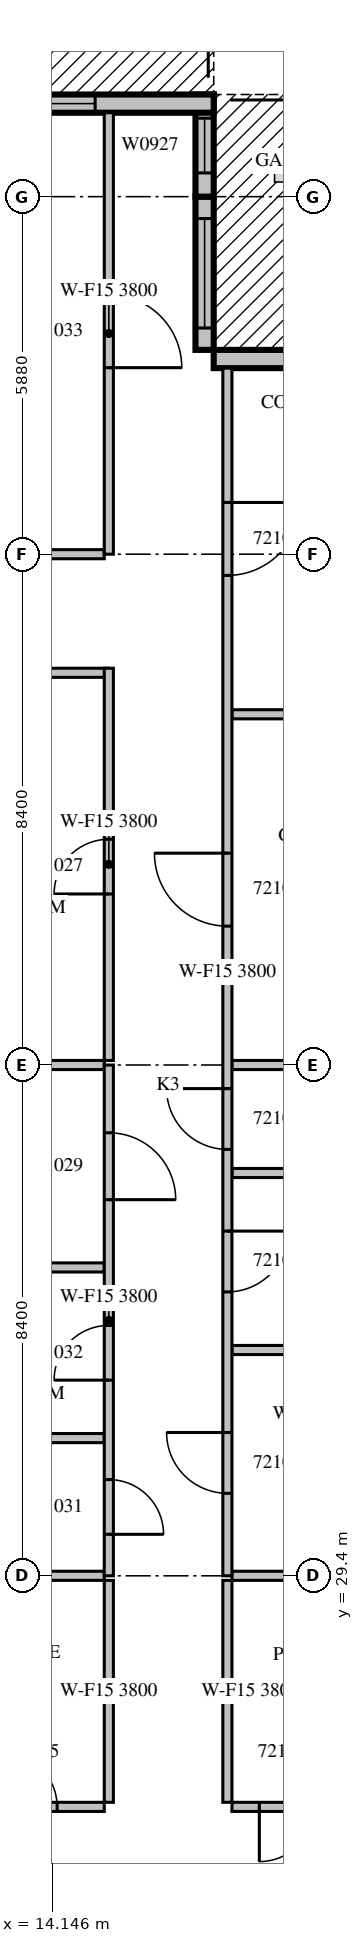
"""IFC4 building model, lengths in metres.
Left out: names, types, materials, properties, quantities, classifications, styles, units other than length and angle.
Written with IfcOpenShell. Run it as: python <this file> out.ifc"""

import sys

from ifc_helpers import new_model, si_unit, direction, frame, frame_2d, origin, place, context, subcontext, project, spatial, rectangle, extrude, source, transform, mapped, element, fill, save


model = new_model("IFC4")
c1 = context("Model", 3, precision=1e-05, world=origin(), true_north=direction((0.0, 1.0)))
c2 = subcontext(c1, "Body", "Model", "MODEL_VIEW")
j1 = project(units=[si_unit("LENGTHUNIT", "METRE"), si_unit("PLANEANGLEUNIT", "RADIAN")], contexts=[c1])
p1 = place(None, origin())
s1 = spatial("IfcSite", under=j1, at=p1, CompositionType="ELEMENT")
p2 = place(p1, origin())
s2 = spatial("IfcBuilding", under=s1, at=p2, CompositionType="ELEMENT")
p3 = place(p2, frame((0.0, 0.0, 99.3)))
s3 = spatial("IfcBuildingStorey", under=s2, at=p3, CompositionType="ELEMENT", Elevation=99.3)
m1 = source(origin(), c2, "Body", "SweptSolid", [
    extrude(rectangle(XDim=4.2, YDim=0.3, at=frame_2d((2.1, 0.0))), origin(), (0.0, 0.0, 1.0), 3.8),
])
p4 = place(p3, frame((21.0, 49.41, 0.0), z_axis=(0.0, 0.0, 1.0), x_axis=(-1.0, 0.0, 0.0)))
e1 = element("IfcWall", 1, at=p4, inside=s3, PredefinedType="STANDARD", context=c2, shape_type="MappedRepresentation", body=[
    mapped(m1, transform((0.0, 0.0, 0.0), scale=1.0)),
])
m2 = source(origin(), c2, "Body", "SweptSolid", [
    extrude(rectangle(XDim=1.8, YDim=2.4, at=frame_2d((0.9, 1.2))), frame((0.0, 0.16, 0.0), z_axis=(0.0, -1.0, 0.0), x_axis=(1.0, 0.0, 0.0)), (0.0, 0.0, 1.0), 0.32),
])
p5 = place(p4, frame((1.2, 0.0, 0.0)))
e2 = element("IfcOpeningElement", 2, at=p5, cuts=e1, PredefinedType="OPENING", context=c2, shape_type="MappedRepresentation", body=[
    mapped(m2, transform((0.0, 0.0, 0.0), scale=1.0)),
])
m3 = source(origin(), c2, "Body", "SweptSolid", [
    extrude(rectangle(XDim=2.52, YDim=0.3, at=frame_2d((1.26, 0.0))), origin(), (0.0, 0.0, 1.0), 3.8),
])
p6 = place(p3, frame((16.65, 49.56, 0.0), z_axis=(0.0, 0.0, 1.0), x_axis=(0.0, 1.0, 0.0)))
e3 = element("IfcWall", 3, at=p6, inside=s3, PredefinedType="STANDARD", context=c2, shape_type="MappedRepresentation", body=[
    mapped(m3, transform((0.0, 0.0, 0.0), scale=1.0)),
])
p7 = place(p6, frame((0.36, 0.0, 0.0)))
e4 = element("IfcOpeningElement", 4, at=p7, cuts=e3, PredefinedType="OPENING", context=c2, shape_type="MappedRepresentation", body=[
    mapped(m2, transform((0.0, 0.0, 0.0), scale=1.0)),
])
m4 = source(origin(), c2, "Body", "SweptSolid", [
    extrude(rectangle(XDim=1.68, YDim=0.3, at=frame_2d((0.84, 0.0))), origin(), (0.0, 0.0, 1.0), 3.8),
])
p8 = place(p3, frame((16.65, 52.08, 0.0), z_axis=(0.0, 0.0, 1.0), x_axis=(0.0, 1.0, 0.0)))
e5 = element("IfcWall", 5, at=p8, inside=s3, PredefinedType="STANDARD", context=c2, shape_type="MappedRepresentation", body=[
    mapped(m4, transform((0.0, 0.0, 0.0), scale=1.0)),
])
m5 = source(origin(), c2, "Body", "SweptSolid", [
    extrude(rectangle(XDim=0.9, YDim=2.7, at=frame_2d((0.45, 1.35))), frame((0.0, 0.16, 0.0), z_axis=(0.0, -1.0, 0.0), x_axis=(1.0, 0.0, 0.0)), (0.0, 0.0, 1.0), 0.32),
])
p9 = place(p8, frame((0.39, 0.0, 0.6)))
e6 = element("IfcOpeningElement", 6, at=p9, cuts=e5, PredefinedType="OPENING", context=c2, shape_type="MappedRepresentation", body=[
    mapped(m5, transform((0.0, 0.0, 0.0), scale=1.0)),
])
p10 = place(p3, frame((16.8, 53.61, 0.0), z_axis=(0.0, 0.0, 1.0), x_axis=(-1.0, 0.0, 0.0)))
e7 = element("IfcWall", 7, at=p10, inside=s3, PredefinedType="STANDARD", context=c2, shape_type="SweptSolid", body=[
    extrude(rectangle(XDim=10.5, YDim=0.3, at=frame_2d((5.25, 0.0))), origin(), (0.0, 0.0, 1.0), 3.8),
])
p11 = place(p10, frame((1.95, 0.0, 0.0)))
e8 = element("IfcOpeningElement", 8, at=p11, cuts=e7, PredefinedType="OPENING", context=c2, shape_type="MappedRepresentation", body=[
    mapped(m2, transform((0.0, 0.0, 0.0), scale=1.0)),
])
m6 = source(origin(), c2, "Body", "SweptSolid", [
    extrude(rectangle(XDim=1.8, YDim=2.7, at=frame_2d((0.9, 1.35))), frame((0.0, 0.16, 0.0), z_axis=(0.0, -1.0, 0.0), x_axis=(1.0, 0.0, 0.0)), (0.0, 0.0, 1.0), 0.32),
])
p12 = place(p10, frame((8.025, 0.0, 0.6)))
e9 = element("IfcOpeningElement", 9, at=p12, cuts=e7, PredefinedType="OPENING", context=c2, shape_type="MappedRepresentation", body=[
    mapped(m6, transform((0.0, 0.0, 0.0), scale=1.0)),
])
p13 = place(p3, frame((6.505, 25.6, 0.0), z_axis=(0.0, 0.0, 1.0), x_axis=(1.0, 0.0, 0.0)))
e10 = element("IfcWall", 10, at=p13, inside=s3, PredefinedType="PARTITIONING", context=c2, shape_type="SweptSolid", body=[
    extrude(rectangle(XDim=8.495, YDim=0.15, at=frame_2d((4.247, 0.0))), origin(), (0.0, 0.0, 1.0), 3.8),
])
m7 = source(origin(), c2, "Body", "SweptSolid", [
    extrude(rectangle(XDim=0.9, YDim=2.1, at=frame_2d((0.45, 1.05))), frame((0.0, 0.085, 0.0), z_axis=(0.0, -1.0, 0.0), x_axis=(1.0, 0.0, 0.0)), (0.0, 0.0, 1.0), 0.17),
])
p14 = place(p13, frame((1.745, 0.0, 0.0)))
e11 = element("IfcOpeningElement", 11, at=p14, cuts=e10, PredefinedType="OPENING", context=c2, shape_type="MappedRepresentation", body=[
    mapped(m7, transform((0.0, 0.0, 0.0), scale=1.0)),
])
p15 = place(p13, frame((6.82, 0.0, 0.0)))
e12 = element("IfcOpeningElement", 12, at=p15, cuts=e10, PredefinedType="OPENING", context=c2, shape_type="MappedRepresentation", body=[
    mapped(m7, transform((0.0, 0.0, 0.0), scale=1.0)),
])
m8 = source(origin(), c2, "Body", "SweptSolid", [
    extrude(rectangle(XDim=3.6, YDim=0.15, at=frame_2d((1.8, 0.0))), origin(), (0.0, 0.0, 1.0), 3.8),
])
p16 = place(p3, frame((17.1, 25.6, 0.0), z_axis=(0.0, 0.0, 1.0), x_axis=(1.0, 0.0, 0.0)))
e13 = element("IfcWall", 13, at=p16, inside=s3, PredefinedType="PARTITIONING", context=c2, shape_type="MappedRepresentation", body=[
    mapped(m8, transform((0.0, 0.0, 0.0), scale=1.0)),
])
p17 = place(p16, frame((0.45, 0.0, 0.0)))
e14 = element("IfcOpeningElement", 14, at=p17, cuts=e13, PredefinedType="OPENING", context=c2, shape_type="MappedRepresentation", body=[
    mapped(m7, transform((0.0, 0.0, 0.0), scale=1.0)),
])
m9 = source(origin(), c2, "Body", "SweptSolid", [
    extrude(rectangle(XDim=3.65, YDim=0.15, at=frame_2d((1.825, 0.0))), origin(), (0.0, 0.0, 1.0), 3.8),
])
for number, where, z_axis, x_axis in (
    (15, (15.075, 25.675, 0.0), (0.0, 0.0, 1.0), (0.0, 1.0, 0.0)),
    (16, (17.025, 29.325, 0.0), (0.0, 0.0, 1.0), (0.0, -1.0, 0.0)),
):
    element("IfcWall", number, at=place(p3, frame(where, z_axis=z_axis, x_axis=x_axis)), inside=s3, PredefinedType="PARTITIONING", context=c2, shape_type="MappedRepresentation", body=[
        mapped(m9, transform((0.0, 0.0, 0.0), scale=1.0)),
    ])
m10 = source(origin(), c2, "Body", "SweptSolid", [
    extrude(rectangle(XDim=3.901, YDim=0.15, at=frame_2d((1.95, 0.0))), origin(), (0.0, 0.0, 1.0), 3.8),
])
p18 = place(p3, frame((15.0, 29.4, 0.0), z_axis=(0.0, 0.0, 1.0), x_axis=(-1.0, 0.0, 0.0)))
e17 = element("IfcWall", 17, at=p18, inside=s3, PredefinedType="PARTITIONING", context=c2, shape_type="MappedRepresentation", body=[
    mapped(m10, transform((0.0, 0.0, 0.0), scale=1.0)),
])
m11 = source(origin(), c2, "Body", "SweptSolid", [
    extrude(rectangle(XDim=2.701, YDim=0.15, at=frame_2d((1.351, 0.0))), origin(), (0.0, 0.0, 1.0), 3.8),
])
p19 = place(p3, frame((19.801, 29.4, 0.0), z_axis=(0.0, 0.0, 1.0), x_axis=(-1.0, 0.0, 0.0)))
e18 = element("IfcWall", 18, at=p19, inside=s3, PredefinedType="PARTITIONING", context=c2, shape_type="MappedRepresentation", body=[
    mapped(m11, transform((0.0, 0.0, 0.0), scale=1.0)),
])
m12 = source(origin(), c2, "Body", "SweptSolid", [
    extrude(rectangle(XDim=3.975, YDim=0.15, at=frame_2d((1.988, 0.0))), origin(), (0.0, 0.0, 1.0), 3.8),
])
p20 = place(p3, frame((15.075, 44.25, 0.0), z_axis=(0.0, 0.0, 1.0), x_axis=(-1.0, 0.0, 0.0)))
e19 = element("IfcWall", 19, at=p20, inside=s3, PredefinedType="PARTITIONING", context=c2, shape_type="MappedRepresentation", body=[
    mapped(m12, transform((0.0, 0.0, 0.0), scale=1.0)),
])
m13 = source(origin(), c2, "Body", "SweptSolid", [
    extrude(rectangle(XDim=6.45, YDim=0.15, at=frame_2d((3.225, 0.0))), origin(), (0.0, 0.0, 1.0), 3.8),
])
p21 = place(p3, frame((15.075, 37.875, 0.0), z_axis=(0.0, 0.0, 1.0), x_axis=(0.0, 1.0, 0.0)))
e20 = element("IfcWall", 20, at=p21, inside=s3, PredefinedType="PARTITIONING", context=c2, shape_type="MappedRepresentation", body=[
    mapped(m13, transform((0.0, 0.0, 0.0), scale=1.0)),
])
p22 = place(p21, frame((2.737, 0.0, 0.0)))
e21 = element("IfcOpeningElement", 21, at=p22, cuts=e20, PredefinedType="OPENING", context=c2, shape_type="MappedRepresentation", body=[
    mapped(m7, transform((0.0, 0.0, 0.0), scale=1.0)),
])
m14 = source(origin(), c2, "Body", "SweptSolid", [
    extrude(rectangle(XDim=3.75, YDim=0.15, at=frame_2d((1.875, 0.0))), origin(), (0.0, 0.0, 1.0), 3.8),
])
for number, where, z_axis, x_axis in (
    (22, (15.0, 31.665, 0.0), (0.0, 0.0, 1.0), (-1.0, 0.0, 0.0)),
    (23, (15.0, 34.471, 0.0), (0.0, 0.0, 1.0), (-1.0, 0.0, 0.0)),
    (24, (15.0, 37.8, 0.0), (0.0, 0.0, 1.0), (-1.0, 0.0, 0.0)),
    (25, (15.0, 46.2, 0.0), (0.0, 0.0, 1.0), (-1.0, 0.0, 0.0)),
):
    element("IfcWall", number, at=place(p3, frame(where, z_axis=z_axis, x_axis=x_axis)), inside=s3, PredefinedType="PARTITIONING", context=c2, shape_type="MappedRepresentation", body=[
        mapped(m14, transform((0.0, 0.0, 0.0), scale=1.0)),
    ])
for number, where, z_axis, x_axis in (
    (26, (17.1, 33.113, 0.0), (0.0, 0.0, 1.0), (1.0, 0.0, 0.0)),
    (27, (17.1, 36.024, 0.0), (0.0, 0.0, 1.0), (1.0, 0.0, 0.0)),
    (28, (17.1, 43.568, 0.0), (0.0, 0.0, 1.0), (1.0, 0.0, 0.0)),
):
    element("IfcWall", number, at=place(p3, frame(where, z_axis=z_axis, x_axis=x_axis)), inside=s3, PredefinedType="PARTITIONING", context=c2, shape_type="MappedRepresentation", body=[
        mapped(m8, transform((0.0, 0.0, 0.0), scale=1.0)),
    ])
p23 = place(p3, frame((19.801, 37.8, 0.0), z_axis=(0.0, 0.0, 1.0), x_axis=(-1.0, 0.0, 0.0)))
e29 = element("IfcWall", 29, at=p23, inside=s3, PredefinedType="PARTITIONING", context=c2, shape_type="MappedRepresentation", body=[
    mapped(m11, transform((0.0, 0.0, 0.0), scale=1.0)),
])
m15 = source(origin(), c2, "Body", "SweptSolid", [
    extrude(rectangle(XDim=8.4, YDim=0.15, at=frame_2d((4.2, 0.0))), origin(), (0.0, 0.0, 1.0), 3.8),
])
p24 = place(p3, frame((15.075, 29.4, 0.0), z_axis=(0.0, 0.0, 1.0), x_axis=(0.0, 1.0, 0.0)))
e30 = element("IfcWall", 30, at=p24, inside=s3, PredefinedType="PARTITIONING", context=c2, shape_type="MappedRepresentation", body=[
    mapped(m15, transform((0.0, 0.0, 0.0), scale=1.0)),
])
m16 = source(origin(), c2, "Body", "SweptSolid", [
    extrude(rectangle(XDim=1.1, YDim=2.1, at=frame_2d((0.55, 1.05))), frame((0.0, 0.085, 0.0), z_axis=(0.0, -1.0, 0.0), x_axis=(1.0, 0.0, 0.0)), (0.0, 0.0, 1.0), 0.17),
])
p25 = place(p24, frame((6.185, 0.0, 0.0)))
e31 = element("IfcOpeningElement", 31, at=p25, cuts=e30, PredefinedType="OPENING", context=c2, shape_type="MappedRepresentation", body=[
    mapped(m16, transform((0.0, 0.0, 0.0), scale=1.0)),
])
p26 = place(p24, frame((0.682, 0.0, 0.0)))
e32 = element("IfcOpeningElement", 32, at=p26, cuts=e30, PredefinedType="OPENING", context=c2, shape_type="MappedRepresentation", body=[
    mapped(m7, transform((0.0, 0.0, 0.0), scale=1.0)),
])
p27 = place(p24, frame((3.218, 0.0, 0.0)))
e33 = element("IfcOpeningElement", 33, at=p27, cuts=e30, PredefinedType="OPENING", context=c2, shape_type="MappedRepresentation", body=[
    mapped(m7, transform((0.0, 0.0, 0.0), scale=1.0)),
])
m17 = source(origin(), c2, "Body", "SweptSolid", [
    extrude(rectangle(XDim=7.26, YDim=0.15, at=frame_2d((3.63, 0.0))), origin(), (0.0, 0.0, 1.0), 3.8),
])
p28 = place(p3, frame((15.075, 46.2, 0.0), z_axis=(0.0, 0.0, 1.0), x_axis=(0.0, 1.0, 0.0)))
e34 = element("IfcWall", 34, at=p28, inside=s3, PredefinedType="PARTITIONING", context=c2, shape_type="MappedRepresentation", body=[
    mapped(m17, transform((0.0, 0.0, 0.0), scale=1.0)),
])
m18 = source(origin(), c2, "Body", "SweptSolid", [
    extrude(rectangle(XDim=1.2, YDim=2.1, at=frame_2d((0.6, 1.05))), frame((0.0, 0.085, 0.0), z_axis=(0.0, -1.0, 0.0), x_axis=(1.0, 0.0, 0.0)), (0.0, 0.0, 1.0), 0.17),
])
p29 = place(p28, frame((3.067, 0.0, 0.0)))
e35 = element("IfcOpeningElement", 35, at=p29, cuts=e34, PredefinedType="OPENING", context=c2, shape_type="MappedRepresentation", body=[
    mapped(m18, transform((0.0, 0.0, 0.0), scale=1.0)),
])
p30 = place(p3, frame((17.025, 49.26, 0.0), z_axis=(0.0, 0.0, 1.0), x_axis=(0.0, -1.0, 0.0)))
e36 = element("IfcWall", 36, at=p30, inside=s3, PredefinedType="PARTITIONING", context=c2, shape_type="SweptSolid", body=[
    extrude(rectangle(XDim=19.86, YDim=0.15, at=frame_2d((9.93, 0.0))), origin(), (0.0, 0.0, 1.0), 3.8),
])
m19 = source(origin(), c2, "Body", "SweptSolid", [
    extrude(rectangle(XDim=1.0, YDim=2.1, at=frame_2d((0.5, 1.05))), frame((0.0, 0.085, 0.0), z_axis=(0.0, -1.0, 0.0), x_axis=(1.0, 0.0, 0.0)), (0.0, 0.0, 1.0), 0.17),
])
p31 = place(p30, frame((17.503, 0.0, 0.0)))
e37 = element("IfcOpeningElement", 37, at=p31, cuts=e36, PredefinedType="OPENING", context=c2, shape_type="MappedRepresentation", body=[
    mapped(m19, transform((0.0, 0.0, 0.0), scale=1.0)),
])
p32 = place(p30, frame((14.191, 0.0, 0.0)))
e38 = element("IfcOpeningElement", 38, at=p32, cuts=e36, PredefinedType="OPENING", context=c2, shape_type="MappedRepresentation", body=[
    mapped(m19, transform((0.0, 0.0, 0.0), scale=1.0)),
])
p33 = place(p30, frame((11.848, 0.0, 0.0)))
e39 = element("IfcOpeningElement", 39, at=p33, cuts=e36, PredefinedType="OPENING", context=c2, shape_type="MappedRepresentation", body=[
    mapped(m19, transform((0.0, 0.0, 0.0), scale=1.0)),
])
p34 = place(p30, frame((7.976, 0.0, 0.0)))
e40 = element("IfcOpeningElement", 40, at=p34, cuts=e36, PredefinedType="OPENING", context=c2, shape_type="MappedRepresentation", body=[
    mapped(m18, transform((0.0, 0.0, 0.0), scale=1.0)),
])
p35 = place(p30, frame((2.209, 0.0, 0.0)))
e41 = element("IfcOpeningElement", 41, at=p35, cuts=e36, PredefinedType="OPENING", context=c2, shape_type="MappedRepresentation", body=[
    mapped(m18, transform((0.0, 0.0, 0.0), scale=1.0)),
])
m20 = source(origin(), c2, "Body", "SweptSolid", [
    extrude(rectangle(XDim=1.8, YDim=2.4, at=frame_2d((0.9, 1.2))), frame((0.0, 0.025, 0.0), z_axis=(0.0, -1.0, 0.0), x_axis=(1.0, 0.0, 0.0)), (0.0, 0.0, 1.0), 0.05),
])
p36 = place(p7, origin())
e42 = element("IfcDoor", 42, at=p36, inside=s3, OperationType="SLIDING_TO_LEFT", PredefinedType="DOOR", context=c2, shape_type="MappedRepresentation", body=[
    mapped(m20, transform((0.0, 0.0, 0.0), scale=1.0)),
])
fill(e4, e42)
m21 = source(origin(), c2, "Body", "SweptSolid", [
    extrude(rectangle(XDim=0.9, YDim=2.7, at=frame_2d((0.45, 1.35))), frame((0.0, 0.03, 0.0), z_axis=(0.0, -1.0, 0.0), x_axis=(1.0, 0.0, 0.0)), (0.0, 0.0, 1.0), 0.06),
])
p37 = place(p9, origin())
e43 = element("IfcWindow", 43, at=p37, inside=s3, PartitioningType="SINGLE_PANEL", PredefinedType="WINDOW", context=c2, shape_type="MappedRepresentation", body=[
    mapped(m21, transform((0.0, 0.0, 0.0), scale=1.0)),
])
fill(e6, e43)
p38 = place(p11, origin())
e44 = element("IfcDoor", 44, at=p38, inside=s3, OperationType="SLIDING_TO_LEFT", PredefinedType="DOOR", context=c2, shape_type="MappedRepresentation", body=[
    mapped(m20, transform((0.0, 0.0, 0.0), scale=1.0)),
])
fill(e8, e44)
m22 = source(origin(), c2, "Body", "SweptSolid", [
    extrude(rectangle(XDim=0.9, YDim=2.1, at=frame_2d((0.45, 1.05))), frame((0.0, 0.025, 0.0), z_axis=(0.0, -1.0, 0.0), x_axis=(1.0, 0.0, 0.0)), (0.0, 0.0, 1.0), 0.05),
])
p39 = place(p15, origin())
e45 = element("IfcDoor", 45, at=p39, inside=s3, OperationType="SINGLE_SWING_LEFT", PredefinedType="DOOR", context=c2, shape_type="MappedRepresentation", body=[
    mapped(m22, transform((0.0, 0.0, 0.0), scale=1.0)),
])
fill(e12, e45)
p40 = place(p17, origin())
e46 = element("IfcDoor", 46, at=p40, inside=s3, OperationType="SINGLE_SWING_RIGHT", PredefinedType="DOOR", context=c2, shape_type="MappedRepresentation", body=[
    mapped(m22, transform((0.0, 0.0, 0.0), scale=1.0)),
])
fill(e14, e46)
p41 = place(p22, origin())
e47 = element("IfcDoor", 47, at=p41, inside=s3, OperationType="SINGLE_SWING_LEFT", PredefinedType="DOOR", context=c2, shape_type="MappedRepresentation", body=[
    mapped(m22, transform((0.0, 0.0, 0.0), scale=1.0)),
])
fill(e21, e47)
m23 = source(origin(), c2, "Body", "SweptSolid", [
    extrude(rectangle(XDim=1.1, YDim=2.1, at=frame_2d((0.55, 1.05))), frame((0.0, 0.025, 0.0), z_axis=(0.0, -1.0, 0.0), x_axis=(1.0, 0.0, 0.0)), (0.0, 0.0, 1.0), 0.05),
])
p42 = place(p25, origin())
e48 = element("IfcDoor", 48, at=p42, inside=s3, OperationType="SINGLE_SWING_RIGHT", PredefinedType="DOOR", context=c2, shape_type="MappedRepresentation", body=[
    mapped(m23, transform((0.0, 0.0, 0.0), scale=1.0)),
])
fill(e31, e48)
p43 = place(p26, origin())
e49 = element("IfcDoor", 49, at=p43, inside=s3, OperationType="SINGLE_SWING_RIGHT", PredefinedType="DOOR", context=c2, shape_type="MappedRepresentation", body=[
    mapped(m22, transform((0.0, 0.0, 0.0), scale=1.0)),
])
fill(e32, e49)
p44 = place(p27, origin())
e50 = element("IfcDoor", 50, at=p44, inside=s3, OperationType="SINGLE_SWING_LEFT", PredefinedType="DOOR", context=c2, shape_type="MappedRepresentation", body=[
    mapped(m22, transform((0.0, 0.0, 0.0), scale=1.0)),
])
fill(e33, e50)
m24 = source(origin(), c2, "Body", "SweptSolid", [
    extrude(rectangle(XDim=1.2, YDim=2.1, at=frame_2d((0.6, 1.05))), frame((0.0, 0.025, 0.0), z_axis=(0.0, -1.0, 0.0), x_axis=(1.0, 0.0, 0.0)), (0.0, 0.0, 1.0), 0.05),
])
p45 = place(p29, origin())
e51 = element("IfcDoor", 51, at=p45, inside=s3, OperationType="SINGLE_SWING_RIGHT", PredefinedType="DOOR", context=c2, shape_type="MappedRepresentation", body=[
    mapped(m24, transform((0.0, 0.0, 0.0), scale=1.0)),
])
fill(e35, e51)
m25 = source(origin(), c2, "Body", "SweptSolid", [
    extrude(rectangle(XDim=1.0, YDim=2.1, at=frame_2d((0.5, 1.05))), frame((0.0, 0.025, 0.0), z_axis=(0.0, -1.0, 0.0), x_axis=(1.0, 0.0, 0.0)), (0.0, 0.0, 1.0), 0.05),
])
p46 = place(p31, origin())
e52 = element("IfcDoor", 52, at=p46, inside=s3, OperationType="SINGLE_SWING_RIGHT", PredefinedType="DOOR", context=c2, shape_type="MappedRepresentation", body=[
    mapped(m25, transform((0.0, 0.0, 0.0), scale=1.0)),
])
fill(e37, e52)
p47 = place(p32, origin())
e53 = element("IfcDoor", 53, at=p47, inside=s3, OperationType="SINGLE_SWING_LEFT", PredefinedType="DOOR", context=c2, shape_type="MappedRepresentation", body=[
    mapped(m25, transform((0.0, 0.0, 0.0), scale=1.0)),
])
fill(e38, e53)
p48 = place(p33, origin())
e54 = element("IfcDoor", 54, at=p48, inside=s3, OperationType="SINGLE_SWING_RIGHT", PredefinedType="DOOR", context=c2, shape_type="MappedRepresentation", body=[
    mapped(m25, transform((0.0, 0.0, 0.0), scale=1.0)),
])
fill(e39, e54)
p49 = place(p34, origin())
e55 = element("IfcDoor", 55, at=p49, inside=s3, OperationType="SINGLE_SWING_RIGHT", PredefinedType="DOOR", context=c2, shape_type="MappedRepresentation", body=[
    mapped(m24, transform((0.0, 0.0, 0.0), scale=1.0)),
])
fill(e40, e55)
p50 = place(p35, origin())
e56 = element("IfcDoor", 56, at=p50, inside=s3, OperationType="SINGLE_SWING_LEFT", PredefinedType="DOOR", context=c2, shape_type="MappedRepresentation", body=[
    mapped(m24, transform((0.0, 0.0, 0.0), scale=1.0)),
])
fill(e41, e56)
save(model, sys.argv[1])
